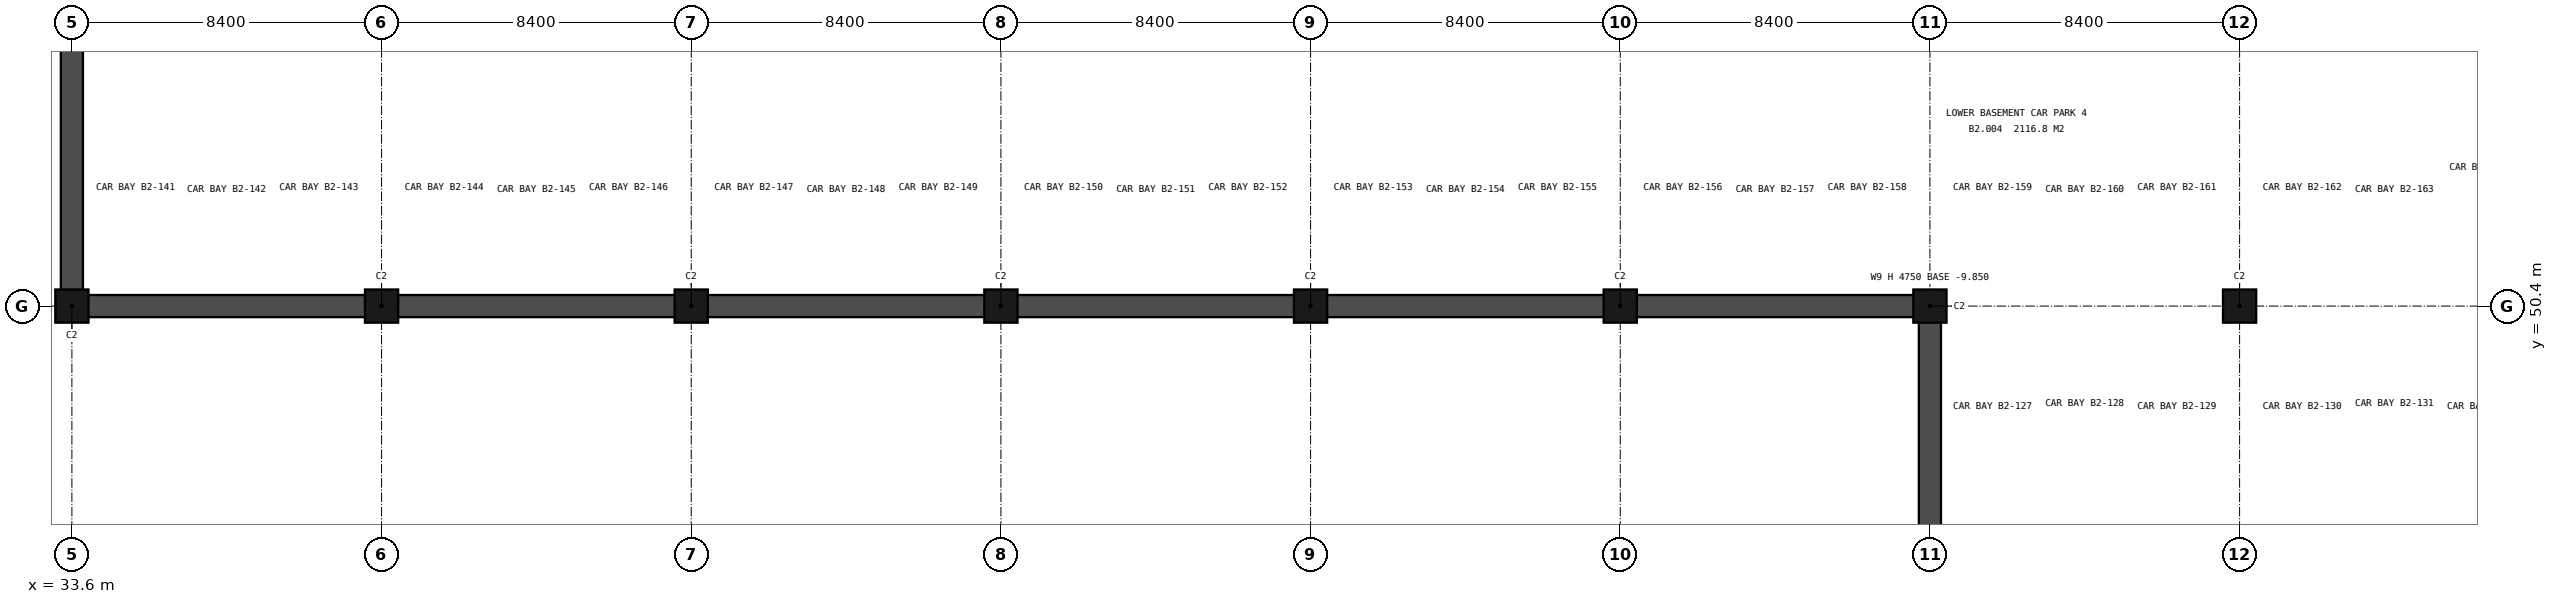
"""IFC4 building model, lengths in metres.
Left out: names, types, materials, properties, quantities, classifications, styles, units other than length and angle.
Written with IfcOpenShell. Run it as: python <this file> out.ifc"""

import sys

from ifc_helpers import new_model, si_unit, direction, frame, frame_2d, origin, origin_2d, place, context, subcontext, project, spatial, rectangle, extrude, element, save


model = new_model("IFC4")
c1 = context("Model", 3, precision=1e-05, world=origin(), true_north=direction((0.0, 1.0)))
c2 = subcontext(c1, "Body", "Model", "MODEL_VIEW")
j1 = project(units=[si_unit("LENGTHUNIT", "METRE"), si_unit("PLANEANGLEUNIT", "RADIAN")], contexts=[c1])
p1 = place(None, origin())
s1 = spatial("IfcSite", under=j1, at=p1, CompositionType="ELEMENT")
p2 = place(p1, origin())
s2 = spatial("IfcBuilding", under=s1, at=p2, CompositionType="ELEMENT")
p3 = place(p2, frame((0.0, 0.0, -9.6)))
s3 = spatial("IfcBuildingStorey", under=s2, at=p3, CompositionType="ELEMENT", Elevation=-9.6)
for number, where, z_axis, x_axis in (
    (1, (33.6, 50.4, -0.25), (0.0, 0.0, 1.0), (1.0, 0.0, 0.0)),
    (2, (42.0, 50.4, -0.25), (0.0, 0.0, 1.0), (1.0, 0.0, 0.0)),
    (3, (50.4, 50.4, -0.25), (0.0, 0.0, 1.0), (1.0, 0.0, 0.0)),
    (4, (58.8, 50.4, -0.25), (0.0, 0.0, 1.0), (1.0, 0.0, 0.0)),
    (5, (67.2, 50.4, -0.25), (0.0, 0.0, 1.0), (1.0, 0.0, 0.0)),
    (6, (75.6, 50.4, -0.25), (0.0, 0.0, 1.0), (1.0, 0.0, 0.0)),
    (7, (84.0, 50.4, -0.25), (0.0, 0.0, 1.0), (1.0, 0.0, 0.0)),
    (8, (92.4, 50.4, -0.25), (0.0, 0.0, 1.0), (1.0, 0.0, 0.0)),
):
    element("IfcColumn", number, at=place(p3, frame(where, z_axis=z_axis, x_axis=x_axis)), inside=s3, PredefinedType="COLUMN", context=c2, shape_type="SweptSolid", body=[
        extrude(rectangle(XDim=0.9, YDim=0.9, at=origin_2d()), origin(), (0.0, 0.0, 1.0), 4.75),
    ])
p4 = place(p3, frame((33.6, 84.3, -0.25), z_axis=(0.0, 0.0, 1.0), x_axis=(0.0, -1.0, 0.0)))
e9 = element("IfcWall", 9, at=p4, inside=s3, PredefinedType="SOLIDWALL", context=c2, shape_type="SweptSolid", body=[
    extrude(rectangle(XDim=34.2, YDim=0.6, at=frame_2d((17.1, 0.0))), origin(), (0.0, 0.0, 1.0), 4.75),
])
for number, where, z_axis, x_axis in (
    (10, (33.3, 50.4, -0.25), (0.0, 0.0, 1.0), (1.0, 0.0, 0.0)),
    (11, (84.0, 50.7, -0.25), (0.0, 0.0, 1.0), (0.0, -1.0, 0.0)),
):
    element("IfcWall", number, at=place(p3, frame(where, z_axis=z_axis, x_axis=x_axis)), inside=s3, PredefinedType="SOLIDWALL", context=c2, shape_type="SweptSolid", body=[
        extrude(rectangle(XDim=51.0, YDim=0.6, at=frame_2d((25.5, 0.0))), origin(), (0.0, 0.0, 1.0), 4.75),
    ])
save(model, sys.argv[1])
